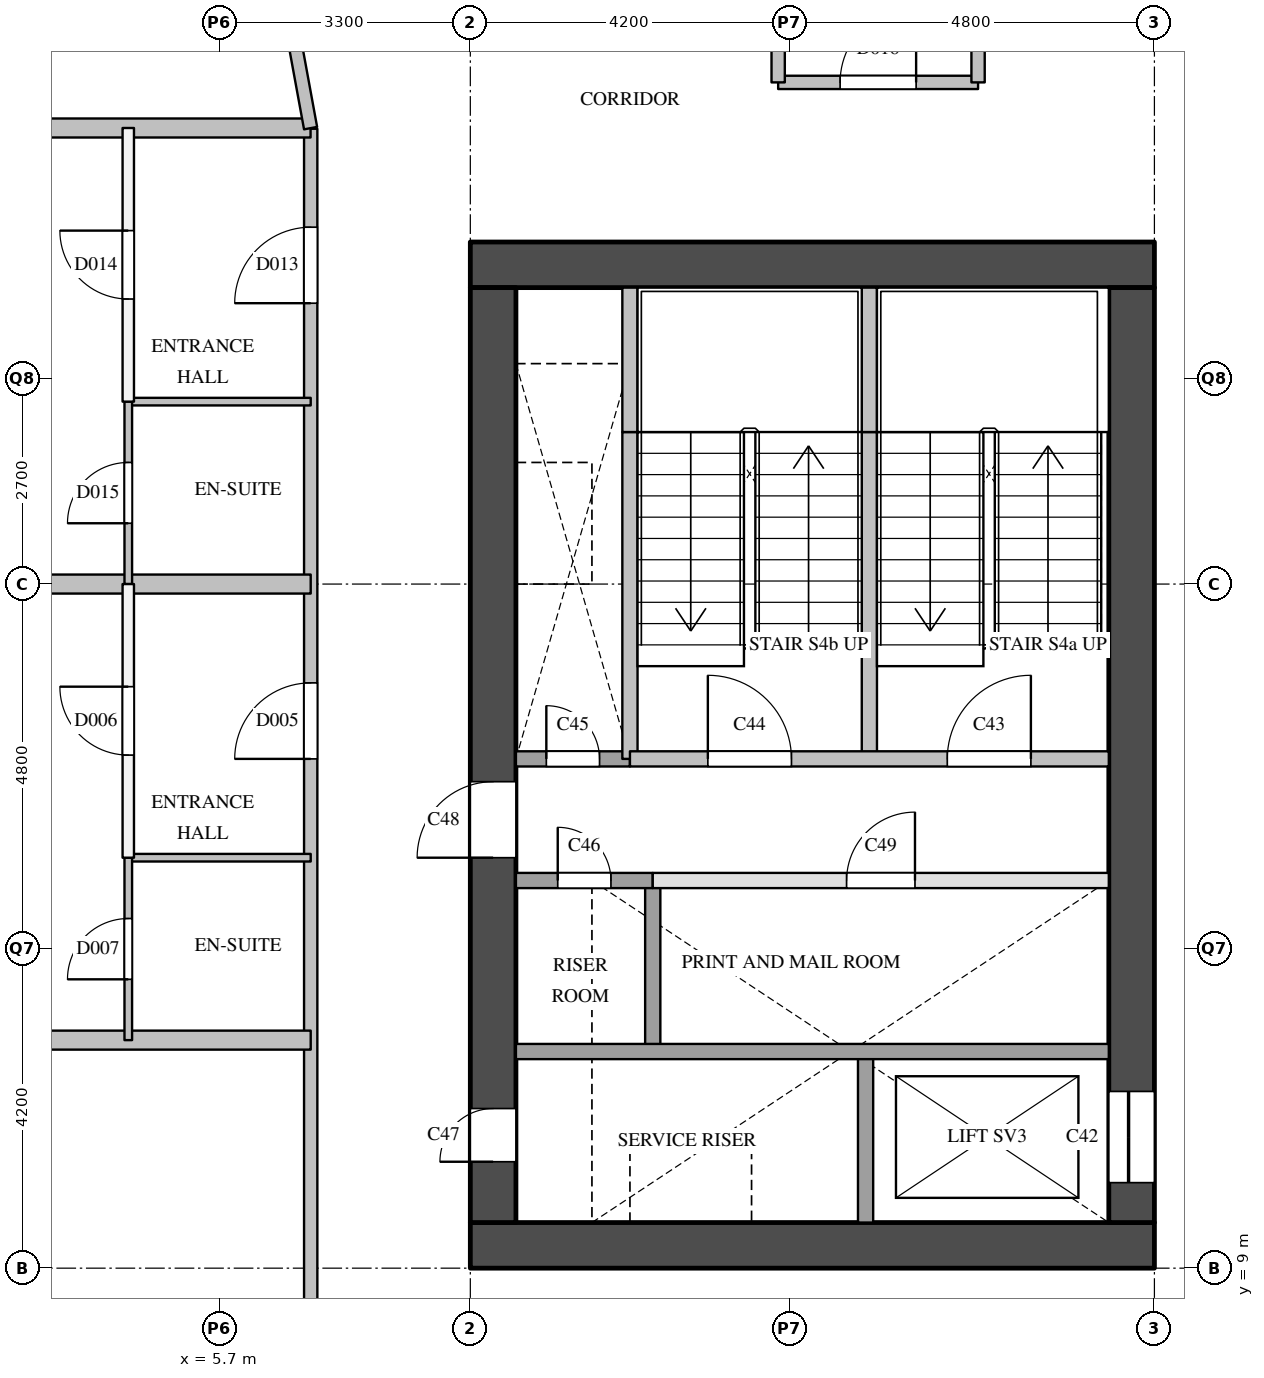
"""IFC4 building model, lengths in metres.
Left out: names, types, materials, properties, quantities, classifications, styles, units other than length and angle.
Written with IfcOpenShell. Run it as: python <this file> out.ifc"""

import sys

from ifc_helpers import new_model, si_unit, direction, frame, frame_2d, origin, place, context, subcontext, project, spatial, rectangle, extrude, element, fill, save


model = new_model("IFC4")
c1 = context("Model", 3, precision=1e-05, world=origin(), true_north=direction((0.0, 1.0)))
c2 = subcontext(c1, "Body", "Model", "MODEL_VIEW")
j1 = project(units=[si_unit("LENGTHUNIT", "METRE"), si_unit("PLANEANGLEUNIT", "RADIAN")], contexts=[c1])
p1 = place(None, origin())
s1 = spatial("IfcSite", under=j1, at=p1, CompositionType="ELEMENT")
p2 = place(p1, origin())
s2 = spatial("IfcBuilding", under=s1, at=p2, CompositionType="ELEMENT")
p3 = place(p2, frame((0.0, 0.0, 46.2)))
s3 = spatial("IfcBuildingStorey", under=s2, at=p3, CompositionType="ELEMENT", Elevation=46.2)
for number, where, z_axis, x_axis in (
    (1, (9.0, 9.3, 0.0), (0.0, 0.0, 1.0), (1.0, 0.0, 0.0)),
    (2, (9.0, 22.2, 0.0), (0.0, 0.0, 1.0), (1.0, 0.0, 0.0)),
):
    element("IfcWall", number, at=place(p3, frame(where, z_axis=z_axis, x_axis=x_axis)), inside=s3, PredefinedType="SHEAR", context=c2, shape_type="SweptSolid", body=[
        extrude(rectangle(XDim=9.0, YDim=0.6, at=frame_2d((4.5, 0.0))), origin(), (0.0, 0.0, 1.0), 3.5),
    ])
p4 = place(p3, frame((9.3, 9.6, 0.0), z_axis=(0.0, 0.0, 1.0), x_axis=(0.0, 1.0, 0.0)))
e3 = element("IfcWall", 3, at=p4, inside=s3, PredefinedType="SHEAR", context=c2, shape_type="SweptSolid", body=[
    extrude(rectangle(XDim=12.3, YDim=0.6, at=frame_2d((6.15, 0.0))), origin(), (0.0, 0.0, 1.0), 3.5),
])
p5 = place(p4, frame((0.8, 0.0, 0.0)))
e4 = element("IfcOpeningElement", 4, at=p5, cuts=e3, PredefinedType="OPENING", context=c2, shape_type="SweptSolid", body=[
    extrude(rectangle(XDim=0.7, YDim=2.1, at=frame_2d((0.35, 1.05))), frame((0.0, 0.31, 0.0), z_axis=(0.0, -1.0, 0.0), x_axis=(1.0, 0.0, 0.0)), (0.0, 0.0, 1.0), 0.62),
])
p6 = place(p4, frame((4.8, 0.0, 0.0)))
e5 = element("IfcOpeningElement", 5, at=p6, cuts=e3, PredefinedType="OPENING", context=c2, shape_type="SweptSolid", body=[
    extrude(rectangle(XDim=1.0, YDim=2.1, at=frame_2d((0.5, 1.05))), frame((0.0, 0.31, 0.0), z_axis=(0.0, -1.0, 0.0), x_axis=(1.0, 0.0, 0.0)), (0.0, 0.0, 1.0), 0.62),
])
p7 = place(p3, frame((17.7, 9.6, 0.0), z_axis=(0.0, 0.0, 1.0), x_axis=(0.0, 1.0, 0.0)))
e6 = element("IfcWall", 6, at=p7, inside=s3, PredefinedType="SHEAR", context=c2, shape_type="SweptSolid", body=[
    extrude(rectangle(XDim=12.3, YDim=0.6, at=frame_2d((6.15, 0.0))), origin(), (0.0, 0.0, 1.0), 3.5),
])
p8 = place(p7, frame((0.525, 0.0, 0.0)))
e7 = element("IfcOpeningElement", 7, at=p8, cuts=e6, PredefinedType="OPENING", context=c2, shape_type="SweptSolid", body=[
    extrude(rectangle(XDim=1.2, YDim=2.1, at=frame_2d((0.6, 1.05))), frame((0.0, 0.31, 0.0), z_axis=(0.0, -1.0, 0.0), x_axis=(1.0, 0.0, 0.0)), (0.0, 0.0, 1.0), 0.62),
])
p9 = place(p3, frame((11.1, 15.7, 0.0), z_axis=(0.0, 0.0, 1.0), x_axis=(0.0, 1.0, 0.0)))
e8 = element("IfcWall", 8, at=p9, inside=s3, PredefinedType="SOLIDWALL", context=c2, shape_type="SweptSolid", body=[
    extrude(rectangle(XDim=4.3, YDim=0.2, at=frame_2d((2.15, 0.0))), origin(), (0.0, 0.0, 1.0), 3.5),
])
p10 = place(p3, frame((11.1, 20.0, 0.0), z_axis=(0.0, 0.0, 1.0), x_axis=(0.0, 1.0, 0.0)))
e9 = element("IfcWall", 9, at=p10, inside=s3, PredefinedType="SOLIDWALL", context=c2, shape_type="SweptSolid", body=[
    extrude(rectangle(XDim=1.9, YDim=0.2, at=frame_2d((0.95, 0.0))), origin(), (0.0, 0.0, 1.0), 3.5),
])
p11 = place(p3, frame((11.4, 11.9, 0.0), z_axis=(0.0, 0.0, 1.0), x_axis=(0.0, 1.0, 0.0)))
e10 = element("IfcWall", 10, at=p11, inside=s3, PredefinedType="SOLIDWALL", context=c2, shape_type="SweptSolid", body=[
    extrude(rectangle(XDim=2.2, YDim=0.2, at=frame_2d((1.1, 0.0))), origin(), (0.0, 0.0, 1.0), 3.5),
])
p12 = place(p3, frame((14.2, 9.6, 0.0), z_axis=(0.0, 0.0, 1.0), x_axis=(0.0, 1.0, 0.0)))
e11 = element("IfcWall", 11, at=p12, inside=s3, PredefinedType="SOLIDWALL", context=c2, shape_type="SweptSolid", body=[
    extrude(rectangle(XDim=2.3, YDim=0.2, at=frame_2d((1.15, 0.0))), origin(), (0.0, 0.0, 1.0), 3.5),
])
p13 = place(p3, frame((14.25, 15.7, 0.0), z_axis=(0.0, 0.0, 1.0), x_axis=(0.0, 1.0, 0.0)))
e12 = element("IfcWall", 12, at=p13, inside=s3, PredefinedType="SOLIDWALL", context=c2, shape_type="SweptSolid", body=[
    extrude(rectangle(XDim=4.3, YDim=0.2, at=frame_2d((2.15, 0.0))), origin(), (0.0, 0.0, 1.0), 3.5),
])
p14 = place(p3, frame((14.25, 20.0, 0.0), z_axis=(0.0, 0.0, 1.0), x_axis=(0.0, 1.0, 0.0)))
e13 = element("IfcWall", 13, at=p14, inside=s3, PredefinedType="SOLIDWALL", context=c2, shape_type="SweptSolid", body=[
    extrude(rectangle(XDim=1.9, YDim=0.2, at=frame_2d((0.95, 0.0))), origin(), (0.0, 0.0, 1.0), 3.5),
])
p15 = place(p3, frame((9.6, 11.85, 0.0), z_axis=(0.0, 0.0, 1.0), x_axis=(1.0, 0.0, 0.0)))
e14 = element("IfcWall", 14, at=p15, inside=s3, PredefinedType="SOLIDWALL", context=c2, shape_type="SweptSolid", body=[
    extrude(rectangle(XDim=7.8, YDim=0.2, at=frame_2d((3.9, 0.0))), origin(), (0.0, 0.0, 1.0), 3.5),
])
p16 = place(p3, frame((11.4, 14.1, 0.0), z_axis=(0.0, 0.0, 1.0), x_axis=(1.0, 0.0, 0.0)))
e15 = element("IfcWall", 15, at=p16, inside=s3, PredefinedType="PARTITIONING", context=c2, shape_type="SweptSolid", body=[
    extrude(rectangle(XDim=6.0, YDim=0.2, at=frame_2d((3.0, 0.0))), origin(), (0.0, 0.0, 1.0), 3.5),
])
p17 = place(p16, frame((2.55, 0.0, 0.0)))
e16 = element("IfcOpeningElement", 16, at=p17, cuts=e15, PredefinedType="OPENING", context=c2, shape_type="SweptSolid", body=[
    extrude(rectangle(XDim=0.9, YDim=2.1, at=frame_2d((0.45, 1.05))), frame((0.0, 0.11, 0.0), z_axis=(0.0, -1.0, 0.0), x_axis=(1.0, 0.0, 0.0)), (0.0, 0.0, 1.0), 0.22),
])
p18 = place(p3, frame((9.6, 14.1, 0.0), z_axis=(0.0, 0.0, 1.0), x_axis=(1.0, 0.0, 0.0)))
e17 = element("IfcWall", 17, at=p18, inside=s3, PredefinedType="SOLIDWALL", context=c2, shape_type="SweptSolid", body=[
    extrude(rectangle(XDim=1.8, YDim=0.2, at=frame_2d((0.9, 0.0))), origin(), (0.0, 0.0, 1.0), 3.5),
])
p19 = place(p18, frame((0.55, 0.0, 0.0)))
e18 = element("IfcOpeningElement", 18, at=p19, cuts=e17, PredefinedType="OPENING", context=c2, shape_type="SweptSolid", body=[
    extrude(rectangle(XDim=0.7, YDim=2.1, at=frame_2d((0.35, 1.05))), frame((0.0, 0.11, 0.0), z_axis=(0.0, -1.0, 0.0), x_axis=(1.0, 0.0, 0.0)), (0.0, 0.0, 1.0), 0.22),
])
p20 = place(p3, frame((9.6, 15.7, 0.0), z_axis=(0.0, 0.0, 1.0), x_axis=(1.0, 0.0, 0.0)))
e19 = element("IfcWall", 19, at=p20, inside=s3, PredefinedType="SOLIDWALL", context=c2, shape_type="SweptSolid", body=[
    extrude(rectangle(XDim=1.5, YDim=0.2, at=frame_2d((0.75, 0.0))), origin(), (0.0, 0.0, 1.0), 3.5),
])
p21 = place(p20, frame((0.4, 0.0, 0.0)))
e20 = element("IfcOpeningElement", 20, at=p21, cuts=e19, PredefinedType="OPENING", context=c2, shape_type="SweptSolid", body=[
    extrude(rectangle(XDim=0.7, YDim=2.1, at=frame_2d((0.35, 1.05))), frame((0.0, 0.11, 0.0), z_axis=(0.0, -1.0, 0.0), x_axis=(1.0, 0.0, 0.0)), (0.0, 0.0, 1.0), 0.22),
])
p22 = place(p3, frame((11.1, 15.7, 0.0), z_axis=(0.0, 0.0, 1.0), x_axis=(1.0, 0.0, 0.0)))
e21 = element("IfcWall", 21, at=p22, inside=s3, PredefinedType="SOLIDWALL", context=c2, shape_type="SweptSolid", body=[
    extrude(rectangle(XDim=6.3, YDim=0.2, at=frame_2d((3.15, 0.0))), origin(), (0.0, 0.0, 1.0), 3.5),
])
p23 = place(p22, frame((4.175, 0.0, 0.0)))
e22 = element("IfcOpeningElement", 22, at=p23, cuts=e21, PredefinedType="OPENING", context=c2, shape_type="SweptSolid", body=[
    extrude(rectangle(XDim=1.1, YDim=2.1, at=frame_2d((0.55, 1.05))), frame((0.0, 0.11, 0.0), z_axis=(0.0, -1.0, 0.0), x_axis=(1.0, 0.0, 0.0)), (0.0, 0.0, 1.0), 0.22),
])
p24 = place(p22, frame((1.025, 0.0, 0.0)))
e23 = element("IfcOpeningElement", 23, at=p24, cuts=e21, PredefinedType="OPENING", context=c2, shape_type="SweptSolid", body=[
    extrude(rectangle(XDim=1.1, YDim=2.1, at=frame_2d((0.55, 1.05))), frame((0.0, 0.11, 0.0), z_axis=(0.0, -1.0, 0.0), x_axis=(1.0, 0.0, 0.0)), (0.0, 0.0, 1.0), 0.22),
])
p25 = place(p3, frame((13.05, 24.6, 0.0), z_axis=(0.0, 0.0, 1.0), x_axis=(1.0, 0.0, 0.0)))
e24 = element("IfcWall", 24, at=p25, inside=s3, PredefinedType="PARTITIONING", context=c2, shape_type="SweptSolid", body=[
    extrude(rectangle(XDim=2.63, YDim=0.175, at=frame_2d((1.315, 0.0))), origin(), (0.0, 0.0, 1.0), 3.5),
])
p26 = place(p25, frame((0.815, 0.0, 0.0)))
e25 = element("IfcOpeningElement", 25, at=p26, cuts=e24, PredefinedType="OPENING", context=c2, shape_type="SweptSolid", body=[
    extrude(rectangle(XDim=1.0, YDim=2.1, at=frame_2d((0.5, 1.05))), frame((0.0, 0.097, 0.0), z_axis=(0.0, -1.0, 0.0), x_axis=(1.0, 0.0, 0.0)), (0.0, 0.0, 1.0), 0.195),
])
p27 = place(p3, frame((6.9, 6.9, 0.0), z_axis=(0.0, 0.0, 1.0), x_axis=(0.0, 1.0, 0.0)))
e26 = element("IfcWall", 26, at=p27, inside=s3, PredefinedType="PARTITIONING", context=c2, shape_type="SweptSolid", body=[
    extrude(rectangle(XDim=17.09, YDim=0.175, at=frame_2d((8.545, 0.0))), origin(), (0.0, 0.0, 1.0), 3.5),
])
p28 = place(p27, frame((8.8, 0.0, 0.0)))
e27 = element("IfcOpeningElement", 27, at=p28, cuts=e26, PredefinedType="OPENING", context=c2, shape_type="SweptSolid", body=[
    extrude(rectangle(XDim=1.0, YDim=2.1, at=frame_2d((0.5, 1.05))), frame((0.0, 0.097, 0.0), z_axis=(0.0, -1.0, 0.0), x_axis=(1.0, 0.0, 0.0)), (0.0, 0.0, 1.0), 0.195),
])
p29 = place(p27, frame((14.795, 0.0, 0.0)))
e28 = element("IfcOpeningElement", 28, at=p29, cuts=e26, PredefinedType="OPENING", context=c2, shape_type="SweptSolid", body=[
    extrude(rectangle(XDim=1.0, YDim=2.1, at=frame_2d((0.5, 1.05))), frame((0.0, 0.097, 0.0), z_axis=(0.0, -1.0, 0.0), x_axis=(1.0, 0.0, 0.0)), (0.0, 0.0, 1.0), 0.195),
])
for number, where, z_axis, x_axis in (
    (29, (13.05, 24.6, 0.0), (0.0, 0.0, 1.0), (0.0, 1.0, 0.0)),
    (30, (15.68, 24.6, 0.0), (0.0, 0.0, 1.0), (0.0, 1.0, 0.0)),
):
    element("IfcWall", number, at=place(p3, frame(where, z_axis=z_axis, x_axis=x_axis)), inside=s3, PredefinedType="PARTITIONING", context=c2, shape_type="SweptSolid", body=[
        extrude(rectangle(XDim=1.8, YDim=0.175, at=frame_2d((0.9, 0.0))), origin(), (0.0, 0.0, 1.0), 3.5),
    ])
p30 = place(p3, frame((4.5, 14.4, 0.0), z_axis=(0.0, 0.0, 1.0), x_axis=(0.0, 1.0, 0.0)))
e31 = element("IfcWall", 31, at=p30, inside=s3, PredefinedType="PARTITIONING", context=c2, shape_type="SweptSolid", body=[
    extrude(rectangle(XDim=3.6, YDim=0.15, at=frame_2d((1.8, 0.0))), origin(), (0.0, 0.0, 1.0), 3.5),
])
p31 = place(p30, frame((1.35, 0.0, 0.0)))
e32 = element("IfcOpeningElement", 32, at=p31, cuts=e31, PredefinedType="OPENING", context=c2, shape_type="SweptSolid", body=[
    extrude(rectangle(XDim=0.9, YDim=2.1, at=frame_2d((0.45, 1.05))), frame((0.0, 0.085, 0.0), z_axis=(0.0, -1.0, 0.0), x_axis=(1.0, 0.0, 0.0)), (0.0, 0.0, 1.0), 0.17),
])
p32 = place(p3, frame((4.5, 20.4, 0.0), z_axis=(0.0, 0.0, 1.0), x_axis=(0.0, 1.0, 0.0)))
e33 = element("IfcWall", 33, at=p32, inside=s3, PredefinedType="PARTITIONING", context=c2, shape_type="SweptSolid", body=[
    extrude(rectangle(XDim=3.6, YDim=0.15, at=frame_2d((1.8, 0.0))), origin(), (0.0, 0.0, 1.0), 3.5),
])
p33 = place(p32, frame((1.35, 0.0, 0.0)))
e34 = element("IfcOpeningElement", 34, at=p33, cuts=e33, PredefinedType="OPENING", context=c2, shape_type="SweptSolid", body=[
    extrude(rectangle(XDim=0.9, YDim=2.1, at=frame_2d((0.45, 1.05))), frame((0.0, 0.085, 0.0), z_axis=(0.0, -1.0, 0.0), x_axis=(1.0, 0.0, 0.0)), (0.0, 0.0, 1.0), 0.17),
])
p34 = place(p3, frame((0.0, 12.0, 0.0), z_axis=(0.0, 0.0, 1.0), x_axis=(1.0, 0.0, 0.0)))
e35 = element("IfcWall", 35, at=p34, inside=s3, PredefinedType="PARTITIONING", context=c2, shape_type="SweptSolid", body=[
    extrude(rectangle(XDim=6.9, YDim=0.25, at=frame_2d((3.45, 0.0))), origin(), (0.0, 0.0, 1.0), 2.5),
])
p35 = place(p3, frame((0.0, 18.0, 0.0), z_axis=(0.0, 0.0, 1.0), x_axis=(1.0, 0.0, 0.0)))
e36 = element("IfcWall", 36, at=p35, inside=s3, PredefinedType="PARTITIONING", context=c2, shape_type="SweptSolid", body=[
    extrude(rectangle(XDim=6.9, YDim=0.25, at=frame_2d((3.45, 0.0))), origin(), (0.0, 0.0, 1.0), 3.5),
])
p36 = place(p3, frame((0.0, 24.0, 0.0), z_axis=(0.0, 0.0, 1.0), x_axis=(1.0, 0.0, 0.0)))
e37 = element("IfcWall", 37, at=p36, inside=s3, PredefinedType="PARTITIONING", context=c2, shape_type="SweptSolid", body=[
    extrude(rectangle(XDim=6.898, YDim=0.25, at=frame_2d((3.449, 0.0))), origin(), (0.0, 0.0, 1.0), 2.5),
])
for number, where, z_axis, x_axis in (
    (38, (4.5, 14.4, 0.0), (0.0, 0.0, 1.0), (1.0, 0.0, 0.0)),
    (39, (4.5, 20.4, 0.0), (0.0, 0.0, 1.0), (1.0, 0.0, 0.0)),
):
    element("IfcWall", number, at=place(p3, frame(where, z_axis=z_axis, x_axis=x_axis)), inside=s3, PredefinedType="PARTITIONING", context=c2, shape_type="SweptSolid", body=[
        extrude(rectangle(XDim=2.4, YDim=0.1, at=frame_2d((1.2, 0.0))), origin(), (0.0, 0.0, 1.0), 3.5),
    ])
p37 = place(p3, frame((4.5, 12.0, 0.0), z_axis=(0.0, 0.0, 1.0), x_axis=(0.0, 1.0, 0.0)))
e40 = element("IfcWall", 40, at=p37, inside=s3, PredefinedType="PARTITIONING", context=c2, shape_type="SweptSolid", body=[
    extrude(rectangle(XDim=2.4, YDim=0.1, at=frame_2d((1.2, 0.0))), origin(), (0.0, 0.0, 1.0), 3.5),
])
p38 = place(p37, frame((0.8, 0.0, 0.0)))
e41 = element("IfcOpeningElement", 41, at=p38, cuts=e40, PredefinedType="OPENING", context=c2, shape_type="SweptSolid", body=[
    extrude(rectangle(XDim=0.8, YDim=2.1, at=frame_2d((0.4, 1.05))), frame((0.0, 0.06, 0.0), z_axis=(0.0, -1.0, 0.0), x_axis=(1.0, 0.0, 0.0)), (0.0, 0.0, 1.0), 0.12),
])
p39 = place(p3, frame((4.5, 18.0, 0.0), z_axis=(0.0, 0.0, 1.0), x_axis=(0.0, 1.0, 0.0)))
e42 = element("IfcWall", 42, at=p39, inside=s3, PredefinedType="PARTITIONING", context=c2, shape_type="SweptSolid", body=[
    extrude(rectangle(XDim=2.4, YDim=0.1, at=frame_2d((1.2, 0.0))), origin(), (0.0, 0.0, 1.0), 3.5),
])
p40 = place(p39, frame((0.8, 0.0, 0.0)))
e43 = element("IfcOpeningElement", 43, at=p40, cuts=e42, PredefinedType="OPENING", context=c2, shape_type="SweptSolid", body=[
    extrude(rectangle(XDim=0.8, YDim=2.1, at=frame_2d((0.4, 1.05))), frame((0.0, 0.06, 0.0), z_axis=(0.0, -1.0, 0.0), x_axis=(1.0, 0.0, 0.0)), (0.0, 0.0, 1.0), 0.12),
])
p41 = place(p3, frame((6.898, 23.998, 0.0), z_axis=(0.0, 0.0, 1.0), x_axis=(-0.180321371357, 0.983607748562, 0.0)))
e44 = element("IfcWall", 44, at=p41, inside=s3, PredefinedType="PARTITIONING", context=c2, shape_type="SweptSolid", body=[
    extrude(rectangle(XDim=1.212, YDim=0.175, at=frame_2d((0.606, 0.0))), origin(), (0.0, 0.0, 1.0), 3.5),
])
p42 = place(p8, origin())
e45 = element("IfcDoor", 45, at=p42, inside=s3, OperationType="SLIDING_TO_LEFT", PredefinedType="DOOR", context=c2, shape_type="SweptSolid", body=[
    extrude(rectangle(XDim=1.2, YDim=2.1, at=frame_2d((0.6, 1.05))), frame((0.0, 0.025, 0.0), z_axis=(0.0, -1.0, 0.0), x_axis=(1.0, 0.0, 0.0)), (0.0, 0.0, 1.0), 0.05),
])
fill(e7, e45)
p43 = place(p23, origin())
e46 = element("IfcDoor", 46, at=p43, inside=s3, OperationType="SINGLE_SWING_RIGHT", PredefinedType="DOOR", context=c2, shape_type="SweptSolid", body=[
    extrude(rectangle(XDim=1.1, YDim=2.1, at=frame_2d((0.55, 1.05))), frame((0.0, 0.025, 0.0), z_axis=(0.0, -1.0, 0.0), x_axis=(1.0, 0.0, 0.0)), (0.0, 0.0, 1.0), 0.05),
])
fill(e22, e46)
p44 = place(p24, origin())
e47 = element("IfcDoor", 47, at=p44, inside=s3, OperationType="SINGLE_SWING_LEFT", PredefinedType="DOOR", context=c2, shape_type="SweptSolid", body=[
    extrude(rectangle(XDim=1.1, YDim=2.1, at=frame_2d((0.55, 1.05))), frame((0.0, 0.025, 0.0), z_axis=(0.0, -1.0, 0.0), x_axis=(1.0, 0.0, 0.0)), (0.0, 0.0, 1.0), 0.05),
])
fill(e23, e47)
p45 = place(p21, origin())
e48 = element("IfcDoor", 48, at=p45, inside=s3, OperationType="SINGLE_SWING_LEFT", PredefinedType="DOOR", context=c2, shape_type="SweptSolid", body=[
    extrude(rectangle(XDim=0.7, YDim=2.1, at=frame_2d((0.35, 1.05))), frame((0.0, 0.025, 0.0), z_axis=(0.0, -1.0, 0.0), x_axis=(1.0, 0.0, 0.0)), (0.0, 0.0, 1.0), 0.05),
])
fill(e20, e48)
p46 = place(p19, origin())
e49 = element("IfcDoor", 49, at=p46, inside=s3, OperationType="SINGLE_SWING_LEFT", PredefinedType="DOOR", context=c2, shape_type="SweptSolid", body=[
    extrude(rectangle(XDim=0.7, YDim=2.1, at=frame_2d((0.35, 1.05))), frame((0.0, 0.025, 0.0), z_axis=(0.0, -1.0, 0.0), x_axis=(1.0, 0.0, 0.0)), (0.0, 0.0, 1.0), 0.05),
])
fill(e18, e49)
p47 = place(p5, origin())
e50 = element("IfcDoor", 50, at=p47, inside=s3, OperationType="SINGLE_SWING_LEFT", PredefinedType="DOOR", context=c2, shape_type="SweptSolid", body=[
    extrude(rectangle(XDim=0.7, YDim=2.1, at=frame_2d((0.35, 1.05))), frame((0.0, 0.025, 0.0), z_axis=(0.0, -1.0, 0.0), x_axis=(1.0, 0.0, 0.0)), (0.0, 0.0, 1.0), 0.05),
])
fill(e4, e50)
p48 = place(p6, origin())
e51 = element("IfcDoor", 51, at=p48, inside=s3, OperationType="SINGLE_SWING_LEFT", PredefinedType="DOOR", context=c2, shape_type="SweptSolid", body=[
    extrude(rectangle(XDim=1.0, YDim=2.1, at=frame_2d((0.5, 1.05))), frame((0.0, 0.025, 0.0), z_axis=(0.0, -1.0, 0.0), x_axis=(1.0, 0.0, 0.0)), (0.0, 0.0, 1.0), 0.05),
])
fill(e5, e51)
p49 = place(p17, origin())
e52 = element("IfcDoor", 52, at=p49, inside=s3, OperationType="SINGLE_SWING_RIGHT", PredefinedType="DOOR", context=c2, shape_type="SweptSolid", body=[
    extrude(rectangle(XDim=0.9, YDim=2.1, at=frame_2d((0.45, 1.05))), frame((0.0, 0.025, 0.0), z_axis=(0.0, -1.0, 0.0), x_axis=(1.0, 0.0, 0.0)), (0.0, 0.0, 1.0), 0.05),
])
fill(e16, e52)
p50 = place(p28, origin())
e53 = element("IfcDoor", 53, at=p50, inside=s3, OperationType="SINGLE_SWING_LEFT", PredefinedType="DOOR", context=c2, shape_type="SweptSolid", body=[
    extrude(rectangle(XDim=1.0, YDim=2.1, at=frame_2d((0.5, 1.05))), frame((0.0, 0.025, 0.0), z_axis=(0.0, -1.0, 0.0), x_axis=(1.0, 0.0, 0.0)), (0.0, 0.0, 1.0), 0.05),
])
fill(e27, e53)
p51 = place(p31, origin())
e54 = element("IfcDoor", 54, at=p51, inside=s3, OperationType="SINGLE_SWING_RIGHT", PredefinedType="DOOR", context=c2, shape_type="SweptSolid", body=[
    extrude(rectangle(XDim=0.9, YDim=2.1, at=frame_2d((0.45, 1.05))), frame((0.0, 0.025, 0.0), z_axis=(0.0, -1.0, 0.0), x_axis=(1.0, 0.0, 0.0)), (0.0, 0.0, 1.0), 0.05),
])
fill(e32, e54)
p52 = place(p38, origin())
e55 = element("IfcDoor", 55, at=p52, inside=s3, OperationType="SINGLE_SWING_LEFT", PredefinedType="DOOR", context=c2, shape_type="SweptSolid", body=[
    extrude(rectangle(XDim=0.8, YDim=2.1, at=frame_2d((0.4, 1.05))), frame((0.0, 0.025, 0.0), z_axis=(0.0, -1.0, 0.0), x_axis=(1.0, 0.0, 0.0)), (0.0, 0.0, 1.0), 0.05),
])
fill(e41, e55)
p53 = place(p29, origin())
e56 = element("IfcDoor", 56, at=p53, inside=s3, OperationType="SINGLE_SWING_LEFT", PredefinedType="DOOR", context=c2, shape_type="SweptSolid", body=[
    extrude(rectangle(XDim=1.0, YDim=2.1, at=frame_2d((0.5, 1.05))), frame((0.0, 0.025, 0.0), z_axis=(0.0, -1.0, 0.0), x_axis=(1.0, 0.0, 0.0)), (0.0, 0.0, 1.0), 0.05),
])
fill(e28, e56)
p54 = place(p33, origin())
e57 = element("IfcDoor", 57, at=p54, inside=s3, OperationType="SINGLE_SWING_RIGHT", PredefinedType="DOOR", context=c2, shape_type="SweptSolid", body=[
    extrude(rectangle(XDim=0.9, YDim=2.1, at=frame_2d((0.45, 1.05))), frame((0.0, 0.025, 0.0), z_axis=(0.0, -1.0, 0.0), x_axis=(1.0, 0.0, 0.0)), (0.0, 0.0, 1.0), 0.05),
])
fill(e34, e57)
p55 = place(p40, origin())
e58 = element("IfcDoor", 58, at=p55, inside=s3, OperationType="SINGLE_SWING_LEFT", PredefinedType="DOOR", context=c2, shape_type="SweptSolid", body=[
    extrude(rectangle(XDim=0.8, YDim=2.1, at=frame_2d((0.4, 1.05))), frame((0.0, 0.025, 0.0), z_axis=(0.0, -1.0, 0.0), x_axis=(1.0, 0.0, 0.0)), (0.0, 0.0, 1.0), 0.05),
])
fill(e43, e58)
p56 = place(p26, origin())
e59 = element("IfcDoor", 59, at=p56, inside=s3, OperationType="SINGLE_SWING_RIGHT", PredefinedType="DOOR", context=c2, shape_type="SweptSolid", body=[
    extrude(rectangle(XDim=1.0, YDim=2.1, at=frame_2d((0.5, 1.05))), frame((0.0, 0.025, 0.0), z_axis=(0.0, -1.0, 0.0), x_axis=(1.0, 0.0, 0.0)), (0.0, 0.0, 1.0), 0.05),
])
fill(e25, e59)
save(model, sys.argv[1])
